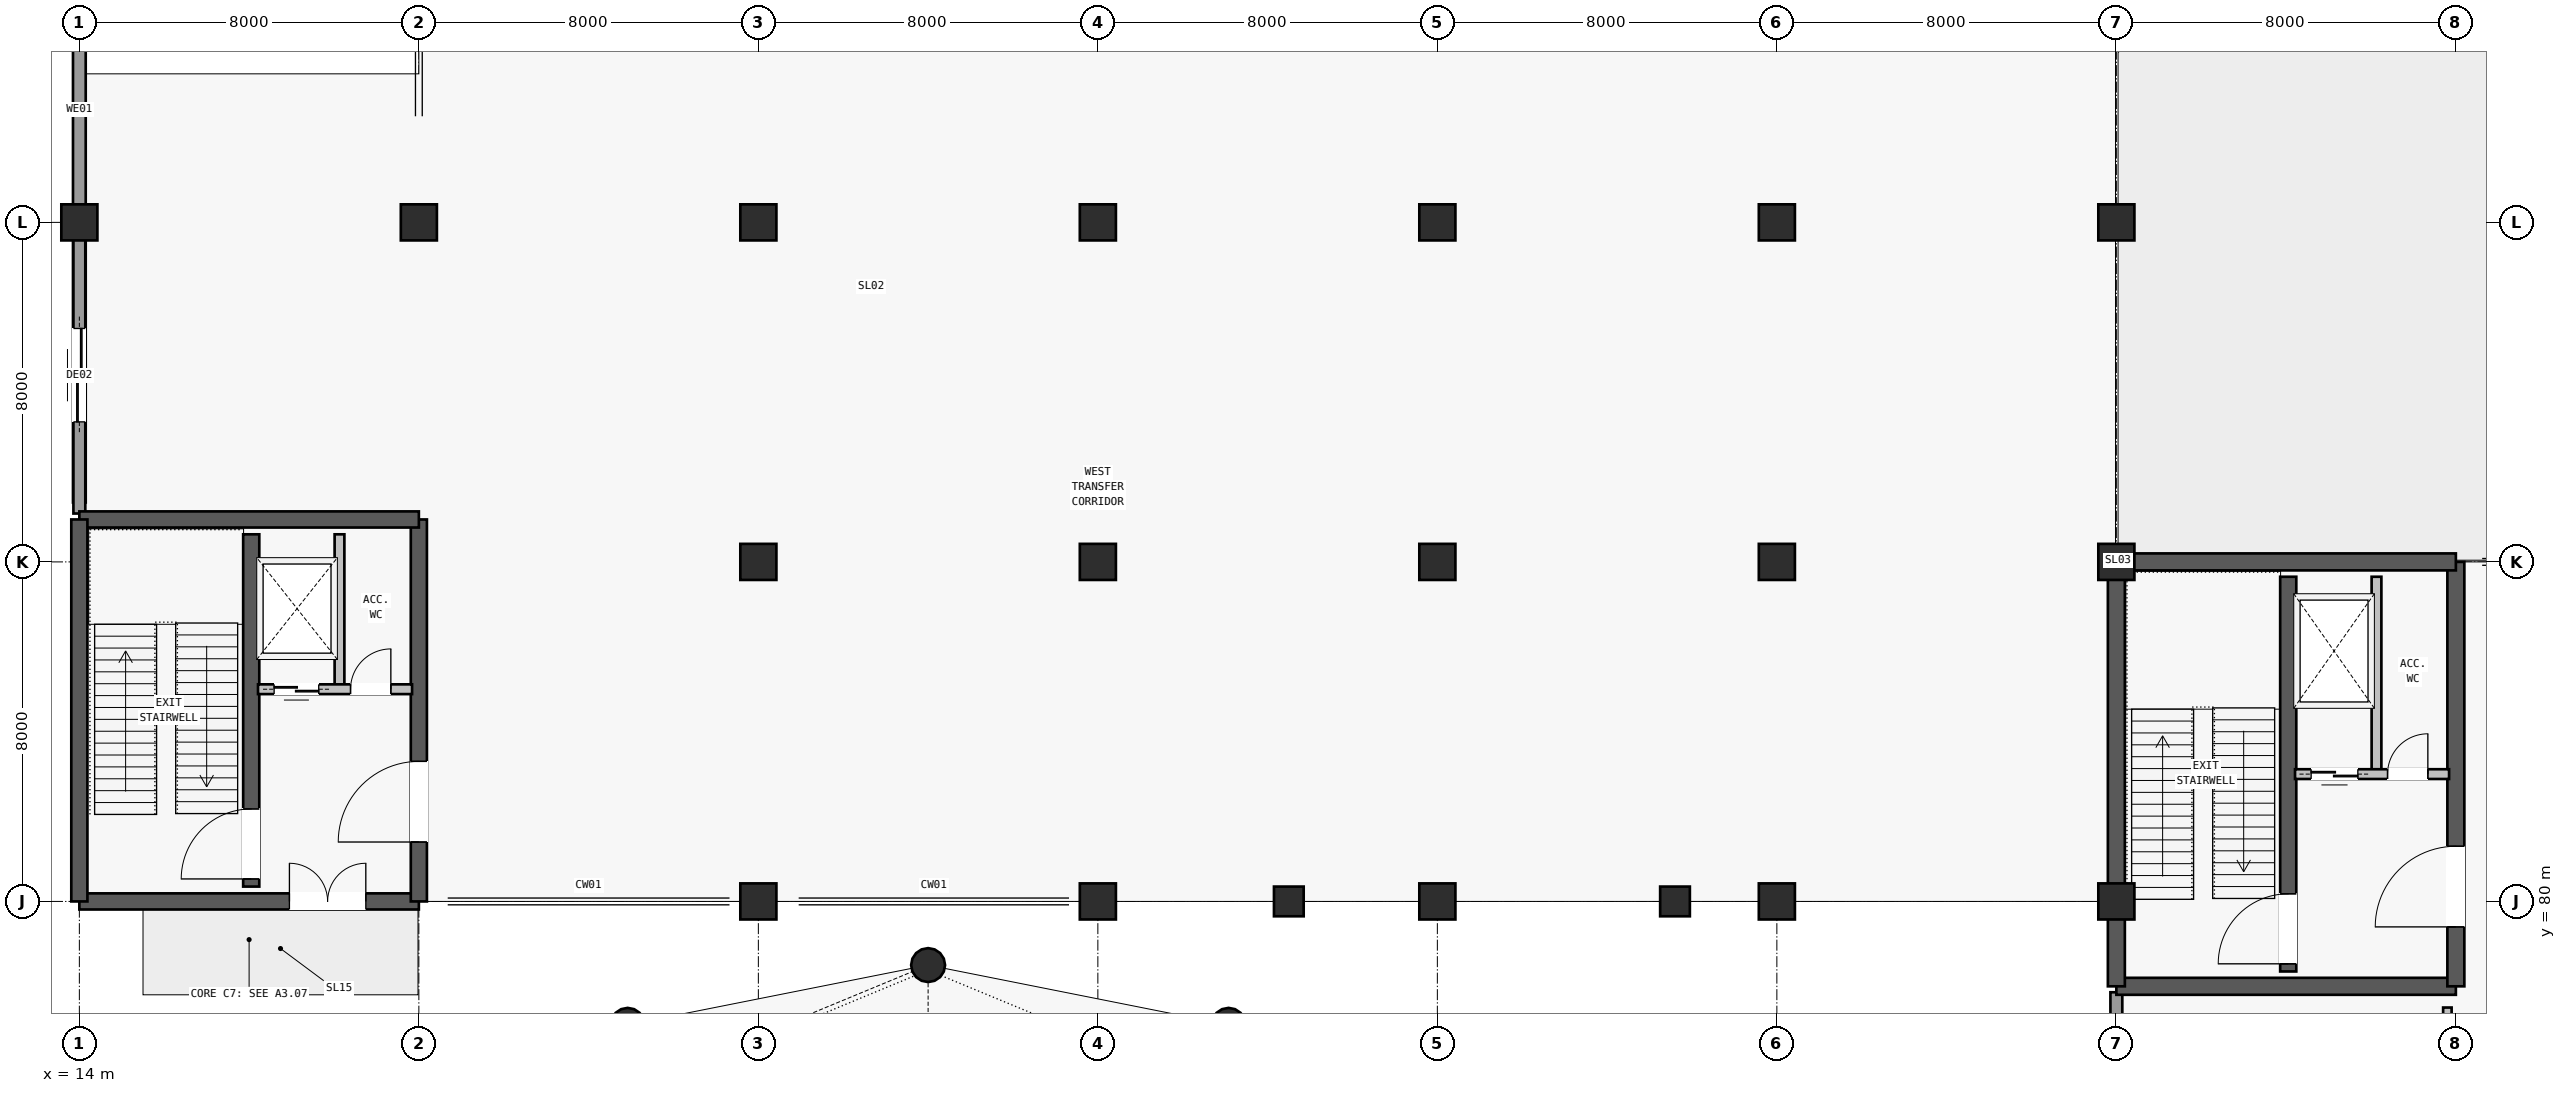
"""IFC4 building model, lengths in metres.
Left out: names, types, materials, properties, quantities, classifications, styles, units other than length and angle.
Written with IfcOpenShell. Run it as: python <this file> out.ifc"""

import sys

from ifc_helpers import new_model, si_unit, direction, frame, frame_2d, origin, origin_2d, place, context, subcontext, project, spatial, rectangle, circle, extrude, element, fill, save


model = new_model("IFC4")
c1 = context("Model", 3, precision=1e-05, world=origin(), true_north=direction((0.0, 1.0)))
c2 = subcontext(c1, "Body", "Model", "MODEL_VIEW")
j1 = project(units=[si_unit("LENGTHUNIT", "METRE"), si_unit("PLANEANGLEUNIT", "RADIAN")], contexts=[c1])
p1 = place(None, origin())
s1 = spatial("IfcSite", under=j1, at=p1, CompositionType="ELEMENT")
p2 = place(p1, origin())
s2 = spatial("IfcBuilding", under=s1, at=p2, CompositionType="ELEMENT")
p3 = place(p2, origin())
s3 = spatial("IfcBuildingStorey", under=s2, at=p3, CompositionType="ELEMENT", Elevation=0.0)
for number, where, z_axis, x_axis in (
    (1, (14.0, 96.0, -0.9), (0.0, 0.0, 1.0), (1.0, 0.0, 0.0)),
    (2, (22.0, 96.0, -0.9), (0.0, 0.0, 1.0), (1.0, 0.0, 0.0)),
    (3, (30.0, 80.0, -0.9), (0.0, 0.0, 1.0), (1.0, 0.0, 0.0)),
    (4, (30.0, 88.0, -0.9), (0.0, 0.0, 1.0), (1.0, 0.0, 0.0)),
    (5, (30.0, 96.0, -0.9), (0.0, 0.0, 1.0), (1.0, 0.0, 0.0)),
    (6, (38.0, 80.0, -0.9), (0.0, 0.0, 1.0), (1.0, 0.0, 0.0)),
    (7, (38.0, 88.0, -0.9), (0.0, 0.0, 1.0), (1.0, 0.0, 0.0)),
    (8, (38.0, 96.0, -0.9), (0.0, 0.0, 1.0), (1.0, 0.0, 0.0)),
    (9, (46.0, 80.0, -0.9), (0.0, 0.0, 1.0), (1.0, 0.0, 0.0)),
    (10, (46.0, 88.0, -0.9), (0.0, 0.0, 1.0), (1.0, 0.0, 0.0)),
    (11, (46.0, 96.0, -0.9), (0.0, 0.0, 1.0), (1.0, 0.0, 0.0)),
    (12, (54.0, 80.0, -0.9), (0.0, 0.0, 1.0), (1.0, 0.0, 0.0)),
    (13, (54.0, 88.0, -0.9), (0.0, 0.0, 1.0), (1.0, 0.0, 0.0)),
    (14, (54.0, 96.0, -0.9), (0.0, 0.0, 1.0), (1.0, 0.0, 0.0)),
    (15, (62.0, 80.0, -0.9), (0.0, 0.0, 1.0), (1.0, 0.0, 0.0)),
    (16, (62.0, 88.0, -0.9), (0.0, 0.0, 1.0), (1.0, 0.0, 0.0)),
    (17, (62.0, 96.0, -0.9), (0.0, 0.0, 1.0), (1.0, 0.0, 0.0)),
):
    element("IfcColumn", number, at=place(p3, frame(where, z_axis=z_axis, x_axis=x_axis)), inside=s3, PredefinedType="COLUMN", context=c2, shape_type="SweptSolid", body=[
        extrude(rectangle(XDim=0.85, YDim=0.85, at=origin_2d()), origin(), (0.0, 0.0, 1.0), 6.5),
    ])
for number, where, z_axis, x_axis in (
    (18, (41.08, 77.092, -0.9), (0.0, 0.0, 1.0), (1.0, 0.0, 0.0)),
    (19, (34.0, 78.5, -0.9), (0.0, 0.0, 1.0), (1.0, 0.0, 0.0)),
    (20, (26.92, 77.092, -0.9), (0.0, 0.0, 1.0), (1.0, 0.0, 0.0)),
):
    element("IfcColumn", number, at=place(p3, frame(where, z_axis=z_axis, x_axis=x_axis)), inside=s3, PredefinedType="COLUMN", context=c2, shape_type="SweptSolid", body=[
        extrude(circle(Radius=0.4, at=origin_2d()), origin(), (0.0, 0.0, 1.0), 6.5),
    ])
for number, where, z_axis, x_axis in (
    (21, (51.6, 80.0, -0.9), (0.0, 0.0, 1.0), (1.0, 0.0, 0.0)),
    (22, (42.5, 80.0, -0.9), (0.0, 0.0, 1.0), (1.0, 0.0, 0.0)),
):
    element("IfcColumn", number, at=place(p3, frame(where, z_axis=z_axis, x_axis=x_axis)), inside=s3, PredefinedType="COLUMN", context=c2, shape_type="SweptSolid", body=[
        extrude(rectangle(XDim=0.7, YDim=0.7, at=origin_2d()), origin(), (0.0, 0.0, 1.0), 6.5),
    ])
p4 = place(p3, frame((14.0, 89.4, -0.9), z_axis=(0.0, 0.0, 1.0), x_axis=(0.0, 1.0, 0.0)))
e23 = element("IfcWall", 23, at=p4, inside=s3, PredefinedType="STANDARD", context=c2, shape_type="SweptSolid", body=[
    extrude(rectangle(XDim=23.6, YDim=0.3, at=frame_2d((11.8, 0.0))), origin(), (0.0, 0.0, 1.0), 0.9),
])
p5 = place(p3, frame((62.0, 77.86, 0.0), z_axis=(0.0, 0.0, 1.0), x_axis=(0.0, -1.0, 0.0)))
e24 = element("IfcWall", 24, at=p5, inside=s3, PredefinedType="STANDARD", context=c2, shape_type="SweptSolid", body=[
    extrude(rectangle(XDim=13.435, YDim=0.28, at=frame_2d((6.718, 0.0))), origin(), (0.0, 0.0, 1.0), 4.2),
])
p6 = place(p5, frame((3.21, 0.0, 0.0)))
e25 = element("IfcOpeningElement", 25, at=p6, cuts=e24, PredefinedType="OPENING", context=c2, shape_type="SweptSolid", body=[
    extrude(rectangle(XDim=1.15, YDim=2.2, at=frame_2d((0.575, 1.1))), frame((0.0, 0.15, 0.0), z_axis=(0.0, -1.0, 0.0), x_axis=(1.0, 0.0, 0.0)), (0.0, 0.0, 1.0), 0.3),
])
p7 = place(p3, frame((14.0, 95.595, 0.0), z_axis=(0.0, 0.0, 1.0), x_axis=(0.0, -1.0, 0.0)))
e26 = element("IfcWall", 26, at=p7, inside=s3, PredefinedType="STANDARD", context=c2, shape_type="SweptSolid", body=[
    extrude(rectangle(XDim=6.455, YDim=0.28, at=frame_2d((3.228, 0.0))), origin(), (0.0, 0.0, 1.0), 4.2),
])
p8 = place(p7, frame((2.095, 0.0, 0.0)))
e27 = element("IfcOpeningElement", 27, at=p8, cuts=e26, PredefinedType="OPENING", context=c2, shape_type="SweptSolid", body=[
    extrude(rectangle(XDim=2.2, YDim=2.4, at=frame_2d((1.1, 1.2))), frame((0.0, 0.15, 0.0), z_axis=(0.0, -1.0, 0.0), x_axis=(1.0, 0.0, 0.0)), (0.0, 0.0, 1.0), 0.3),
])
p9 = place(p3, frame((62.0, 78.0, -0.9), z_axis=(0.0, 0.0, 1.0), x_axis=(1.0, 0.0, 0.0)))
e28 = element("IfcWall", 28, at=p9, inside=s3, PredefinedType="SHEAR", context=c2, shape_type="SweptSolid", body=[
    extrude(rectangle(XDim=8.0, YDim=0.4, at=frame_2d((4.0, 0.0))), origin(), (0.0, 0.0, 1.0), 6.22),
])
p10 = place(p3, frame((70.0, 78.0, -0.9), z_axis=(0.0, 0.0, 1.0), x_axis=(0.0, 1.0, 0.0)))
e29 = element("IfcWall", 29, at=p10, inside=s3, PredefinedType="SHEAR", context=c2, shape_type="SweptSolid", body=[
    extrude(rectangle(XDim=10.0, YDim=0.4, at=frame_2d((5.0, 0.0))), origin(), (0.0, 0.0, 1.0), 6.22),
])
p11 = place(p10, frame((1.4, 0.0, 0.9)))
e30 = element("IfcOpeningElement", 30, at=p11, cuts=e29, PredefinedType="OPENING", context=c2, shape_type="SweptSolid", body=[
    extrude(rectangle(XDim=1.9, YDim=2.3, at=frame_2d((0.95, 1.15))), frame((0.0, 0.21, 0.0), z_axis=(0.0, -1.0, 0.0), x_axis=(1.0, 0.0, 0.0)), (0.0, 0.0, 1.0), 0.42),
])
p12 = place(p3, frame((70.0, 88.0, -0.9), z_axis=(0.0, 0.0, 1.0), x_axis=(-1.0, 0.0, 0.0)))
e31 = element("IfcWall", 31, at=p12, inside=s3, PredefinedType="SHEAR", context=c2, shape_type="SweptSolid", body=[
    extrude(rectangle(XDim=8.0, YDim=0.4, at=frame_2d((4.0, 0.0))), origin(), (0.0, 0.0, 1.0), 6.22),
])
p13 = place(p3, frame((62.0, 88.0, -0.9), z_axis=(0.0, 0.0, 1.0), x_axis=(0.0, -1.0, 0.0)))
e32 = element("IfcWall", 32, at=p13, inside=s3, PredefinedType="SHEAR", context=c2, shape_type="SweptSolid", body=[
    extrude(rectangle(XDim=10.0, YDim=0.4, at=frame_2d((5.0, 0.0))), origin(), (0.0, 0.0, 1.0), 6.22),
])
p14 = place(p3, frame((66.05, 78.35, -0.9), z_axis=(0.0, 0.0, 1.0), x_axis=(0.0, 1.0, 0.0)))
e33 = element("IfcWall", 33, at=p14, inside=s3, PredefinedType="SHEAR", context=c2, shape_type="SweptSolid", body=[
    extrude(rectangle(XDim=9.3, YDim=0.38, at=frame_2d((4.65, 0.0))), origin(), (0.0, 0.0, 1.0), 6.22),
])
p15 = place(p14, frame((0.18, 0.0, 0.9)))
e34 = element("IfcOpeningElement", 34, at=p15, cuts=e33, PredefinedType="OPENING", context=c2, shape_type="SweptSolid", body=[
    extrude(rectangle(XDim=1.65, YDim=2.2, at=frame_2d((0.825, 1.1))), frame((0.0, 0.2, 0.0), z_axis=(0.0, -1.0, 0.0), x_axis=(1.0, 0.0, 0.0)), (0.0, 0.0, 1.0), 0.4),
])
p16 = place(p3, frame((68.13, 83.0, 0.0), z_axis=(0.0, 0.0, 1.0), x_axis=(0.0, 1.0, 0.0)))
e35 = element("IfcWall", 35, at=p16, inside=s3, PredefinedType="PARTITIONING", context=c2, shape_type="SweptSolid", body=[
    extrude(rectangle(XDim=4.65, YDim=0.23, at=frame_2d((2.325, 0.0))), origin(), (0.0, 0.0, 1.0), 4.2),
])
p17 = place(p3, frame((66.21, 83.0, 0.0), z_axis=(0.0, 0.0, 1.0), x_axis=(1.0, 0.0, 0.0)))
e36 = element("IfcWall", 36, at=p17, inside=s3, PredefinedType="PARTITIONING", context=c2, shape_type="SweptSolid", body=[
    extrude(rectangle(XDim=3.63, YDim=0.23, at=frame_2d((1.815, 0.0))), origin(), (0.0, 0.0, 1.0), 4.2),
])
p18 = place(p17, frame((0.38, 0.0, 0.0)))
e37 = element("IfcOpeningElement", 37, at=p18, cuts=e36, PredefinedType="OPENING", context=c2, shape_type="SweptSolid", body=[
    extrude(rectangle(XDim=1.1, YDim=2.15, at=frame_2d((0.55, 1.075))), frame((0.0, 0.125, 0.0), z_axis=(0.0, -1.0, 0.0), x_axis=(1.0, 0.0, 0.0)), (0.0, 0.0, 1.0), 0.25),
])
p19 = place(p17, frame((2.18, 0.0, 0.0)))
e38 = element("IfcOpeningElement", 38, at=p19, cuts=e36, PredefinedType="OPENING", context=c2, shape_type="SweptSolid", body=[
    extrude(rectangle(XDim=0.95, YDim=2.1, at=frame_2d((0.475, 1.05))), frame((0.0, 0.125, 0.0), z_axis=(0.0, -1.0, 0.0), x_axis=(1.0, 0.0, 0.0)), (0.0, 0.0, 1.0), 0.25),
])
p20 = place(p3, frame((14.0, 80.0, -0.9), z_axis=(0.0, 0.0, 1.0), x_axis=(1.0, 0.0, 0.0)))
e39 = element("IfcWall", 39, at=p20, inside=s3, PredefinedType="SHEAR", context=c2, shape_type="SweptSolid", body=[
    extrude(rectangle(XDim=8.0, YDim=0.38, at=frame_2d((4.0, 0.0))), origin(), (0.0, 0.0, 1.0), 6.22),
])
p21 = place(p20, frame((4.95, 0.0, 0.9)))
e40 = element("IfcOpeningElement", 40, at=p21, cuts=e39, PredefinedType="OPENING", context=c2, shape_type="SweptSolid", body=[
    extrude(rectangle(XDim=1.8, YDim=2.25, at=frame_2d((0.9, 1.125))), frame((0.0, 0.2, 0.0), z_axis=(0.0, -1.0, 0.0), x_axis=(1.0, 0.0, 0.0)), (0.0, 0.0, 1.0), 0.4),
])
p22 = place(p3, frame((22.0, 80.0, -0.9), z_axis=(0.0, 0.0, 1.0), x_axis=(0.0, 1.0, 0.0)))
e41 = element("IfcWall", 41, at=p22, inside=s3, PredefinedType="SHEAR", context=c2, shape_type="SweptSolid", body=[
    extrude(rectangle(XDim=9.0, YDim=0.38, at=frame_2d((4.5, 0.0))), origin(), (0.0, 0.0, 1.0), 6.22),
])
p23 = place(p22, frame((1.4, 0.0, 0.9)))
e42 = element("IfcOpeningElement", 42, at=p23, cuts=e41, PredefinedType="OPENING", context=c2, shape_type="SweptSolid", body=[
    extrude(rectangle(XDim=1.9, YDim=2.3, at=frame_2d((0.95, 1.15))), frame((0.0, 0.2, 0.0), z_axis=(0.0, -1.0, 0.0), x_axis=(1.0, 0.0, 0.0)), (0.0, 0.0, 1.0), 0.4),
])
p24 = place(p3, frame((22.0, 89.0, -0.9), z_axis=(0.0, 0.0, 1.0), x_axis=(-1.0, 0.0, 0.0)))
e43 = element("IfcWall", 43, at=p24, inside=s3, PredefinedType="SHEAR", context=c2, shape_type="SweptSolid", body=[
    extrude(rectangle(XDim=8.0, YDim=0.38, at=frame_2d((4.0, 0.0))), origin(), (0.0, 0.0, 1.0), 6.22),
])
p25 = place(p3, frame((14.0, 89.0, -0.9), z_axis=(0.0, 0.0, 1.0), x_axis=(0.0, -1.0, 0.0)))
e44 = element("IfcWall", 44, at=p25, inside=s3, PredefinedType="SHEAR", context=c2, shape_type="SweptSolid", body=[
    extrude(rectangle(XDim=9.0, YDim=0.38, at=frame_2d((4.5, 0.0))), origin(), (0.0, 0.0, 1.0), 6.22),
])
p26 = place(p3, frame((18.05, 80.35, -0.9), z_axis=(0.0, 0.0, 1.0), x_axis=(0.0, 1.0, 0.0)))
e45 = element("IfcWall", 45, at=p26, inside=s3, PredefinedType="SHEAR", context=c2, shape_type="SweptSolid", body=[
    extrude(rectangle(XDim=8.3, YDim=0.38, at=frame_2d((4.15, 0.0))), origin(), (0.0, 0.0, 1.0), 6.22),
])
p27 = place(p26, frame((0.18, 0.0, 0.9)))
e46 = element("IfcOpeningElement", 46, at=p27, cuts=e45, PredefinedType="OPENING", context=c2, shape_type="SweptSolid", body=[
    extrude(rectangle(XDim=1.65, YDim=2.2, at=frame_2d((0.825, 1.1))), frame((0.0, 0.2, 0.0), z_axis=(0.0, -1.0, 0.0), x_axis=(1.0, 0.0, 0.0)), (0.0, 0.0, 1.0), 0.4),
])
p28 = place(p3, frame((20.13, 85.0, 0.0), z_axis=(0.0, 0.0, 1.0), x_axis=(0.0, 1.0, 0.0)))
e47 = element("IfcWall", 47, at=p28, inside=s3, PredefinedType="PARTITIONING", context=c2, shape_type="SweptSolid", body=[
    extrude(rectangle(XDim=3.65, YDim=0.23, at=frame_2d((1.825, 0.0))), origin(), (0.0, 0.0, 1.0), 4.2),
])
p29 = place(p3, frame((18.21, 85.0, 0.0), z_axis=(0.0, 0.0, 1.0), x_axis=(1.0, 0.0, 0.0)))
e48 = element("IfcWall", 48, at=p29, inside=s3, PredefinedType="PARTITIONING", context=c2, shape_type="SweptSolid", body=[
    extrude(rectangle(XDim=3.63, YDim=0.23, at=frame_2d((1.815, 0.0))), origin(), (0.0, 0.0, 1.0), 4.2),
])
p30 = place(p29, frame((0.38, 0.0, 0.0)))
e49 = element("IfcOpeningElement", 49, at=p30, cuts=e48, PredefinedType="OPENING", context=c2, shape_type="SweptSolid", body=[
    extrude(rectangle(XDim=1.05, YDim=2.15, at=frame_2d((0.525, 1.075))), frame((0.0, 0.125, 0.0), z_axis=(0.0, -1.0, 0.0), x_axis=(1.0, 0.0, 0.0)), (0.0, 0.0, 1.0), 0.25),
])
p31 = place(p29, frame((2.18, 0.0, 0.0)))
e50 = element("IfcOpeningElement", 50, at=p31, cuts=e48, PredefinedType="OPENING", context=c2, shape_type="SweptSolid", body=[
    extrude(rectangle(XDim=0.95, YDim=2.1, at=frame_2d((0.475, 1.05))), frame((0.0, 0.125, 0.0), z_axis=(0.0, -1.0, 0.0), x_axis=(1.0, 0.0, 0.0)), (0.0, 0.0, 1.0), 0.25),
])
p32 = place(p3, frame((69.8, 77.5, 0.0), z_axis=(0.0, 0.0, 1.0), x_axis=(0.0, -1.0, 0.0)))
e51 = element("IfcWall", 51, at=p32, inside=s3, PredefinedType="PARTITIONING", context=c2, shape_type="SweptSolid", body=[
    extrude(rectangle(XDim=13.0, YDim=0.2, at=frame_2d((6.5, 0.0))), origin(), (0.0, 0.0, 1.0), 4.2),
])
p33 = place(p32, frame((2.3, 0.0, 0.0)))
e52 = element("IfcOpeningElement", 52, at=p33, cuts=e51, PredefinedType="OPENING", context=c2, shape_type="SweptSolid", body=[
    extrude(rectangle(XDim=1.65, YDim=2.2, at=frame_2d((0.825, 1.1))), frame((0.0, 0.11, 0.0), z_axis=(0.0, -1.0, 0.0), x_axis=(1.0, 0.0, 0.0)), (0.0, 0.0, 1.0), 0.22),
])
p34 = place(p8, origin())
e53 = element("IfcDoor", 53, at=p34, inside=s3, OperationType="SINGLE_SWING_LEFT", PredefinedType="DOOR", context=c2, shape_type="SweptSolid", body=[
    extrude(rectangle(XDim=2.2, YDim=2.4, at=frame_2d((1.1, 1.2))), frame((0.0, 0.025, 0.0), z_axis=(0.0, -1.0, 0.0), x_axis=(1.0, 0.0, 0.0)), (0.0, 0.0, 1.0), 0.05),
])
fill(e27, e53)
p35 = place(p11, origin())
e54 = element("IfcDoor", 54, at=p35, inside=s3, OperationType="SINGLE_SWING_LEFT", PredefinedType="DOOR", context=c2, shape_type="SweptSolid", body=[
    extrude(rectangle(XDim=1.9, YDim=2.3, at=frame_2d((0.95, 1.15))), frame((0.0, 0.025, 0.0), z_axis=(0.0, -1.0, 0.0), x_axis=(1.0, 0.0, 0.0)), (0.0, 0.0, 1.0), 0.05),
])
fill(e30, e54)
p36 = place(p15, origin())
e55 = element("IfcDoor", 55, at=p36, inside=s3, OperationType="SINGLE_SWING_LEFT", PredefinedType="DOOR", context=c2, shape_type="SweptSolid", body=[
    extrude(rectangle(XDim=1.65, YDim=2.2, at=frame_2d((0.825, 1.1))), frame((0.0, 0.025, 0.0), z_axis=(0.0, -1.0, 0.0), x_axis=(1.0, 0.0, 0.0)), (0.0, 0.0, 1.0), 0.05),
])
fill(e34, e55)
p37 = place(p18, origin())
e56 = element("IfcDoor", 56, at=p37, inside=s3, OperationType="SLIDING_TO_LEFT", PredefinedType="DOOR", context=c2, shape_type="SweptSolid", body=[
    extrude(rectangle(XDim=1.1, YDim=2.15, at=frame_2d((0.55, 1.075))), frame((0.0, 0.025, 0.0), z_axis=(0.0, -1.0, 0.0), x_axis=(1.0, 0.0, 0.0)), (0.0, 0.0, 1.0), 0.05),
])
fill(e37, e56)
p38 = place(p19, origin())
e57 = element("IfcDoor", 57, at=p38, inside=s3, OperationType="SINGLE_SWING_RIGHT", PredefinedType="DOOR", context=c2, shape_type="SweptSolid", body=[
    extrude(rectangle(XDim=0.95, YDim=2.1, at=frame_2d((0.475, 1.05))), frame((0.0, 0.025, 0.0), z_axis=(0.0, -1.0, 0.0), x_axis=(1.0, 0.0, 0.0)), (0.0, 0.0, 1.0), 0.05),
])
fill(e38, e57)
p39 = place(p21, origin())
e58 = element("IfcDoor", 58, at=p39, inside=s3, OperationType="DOUBLE_SWING_LEFT", PredefinedType="DOOR", context=c2, shape_type="SweptSolid", body=[
    extrude(rectangle(XDim=1.8, YDim=2.25, at=frame_2d((0.9, 1.125))), frame((0.0, 0.025, 0.0), z_axis=(0.0, -1.0, 0.0), x_axis=(1.0, 0.0, 0.0)), (0.0, 0.0, 1.0), 0.05),
])
fill(e40, e58)
p40 = place(p23, origin())
e59 = element("IfcDoor", 59, at=p40, inside=s3, OperationType="SINGLE_SWING_LEFT", PredefinedType="DOOR", context=c2, shape_type="SweptSolid", body=[
    extrude(rectangle(XDim=1.9, YDim=2.3, at=frame_2d((0.95, 1.15))), frame((0.0, 0.025, 0.0), z_axis=(0.0, -1.0, 0.0), x_axis=(1.0, 0.0, 0.0)), (0.0, 0.0, 1.0), 0.05),
])
fill(e42, e59)
p41 = place(p27, origin())
e60 = element("IfcDoor", 60, at=p41, inside=s3, OperationType="SINGLE_SWING_LEFT", PredefinedType="DOOR", context=c2, shape_type="SweptSolid", body=[
    extrude(rectangle(XDim=1.65, YDim=2.2, at=frame_2d((0.825, 1.1))), frame((0.0, 0.025, 0.0), z_axis=(0.0, -1.0, 0.0), x_axis=(1.0, 0.0, 0.0)), (0.0, 0.0, 1.0), 0.05),
])
fill(e46, e60)
p42 = place(p30, origin())
e61 = element("IfcDoor", 61, at=p42, inside=s3, OperationType="SLIDING_TO_LEFT", PredefinedType="DOOR", context=c2, shape_type="SweptSolid", body=[
    extrude(rectangle(XDim=1.05, YDim=2.15, at=frame_2d((0.525, 1.075))), frame((0.0, 0.025, 0.0), z_axis=(0.0, -1.0, 0.0), x_axis=(1.0, 0.0, 0.0)), (0.0, 0.0, 1.0), 0.05),
])
fill(e49, e61)
p43 = place(p31, origin())
e62 = element("IfcDoor", 62, at=p43, inside=s3, OperationType="SINGLE_SWING_RIGHT", PredefinedType="DOOR", context=c2, shape_type="SweptSolid", body=[
    extrude(rectangle(XDim=0.95, YDim=2.1, at=frame_2d((0.475, 1.05))), frame((0.0, 0.025, 0.0), z_axis=(0.0, -1.0, 0.0), x_axis=(1.0, 0.0, 0.0)), (0.0, 0.0, 1.0), 0.05),
])
fill(e50, e62)
save(model, sys.argv[1])
